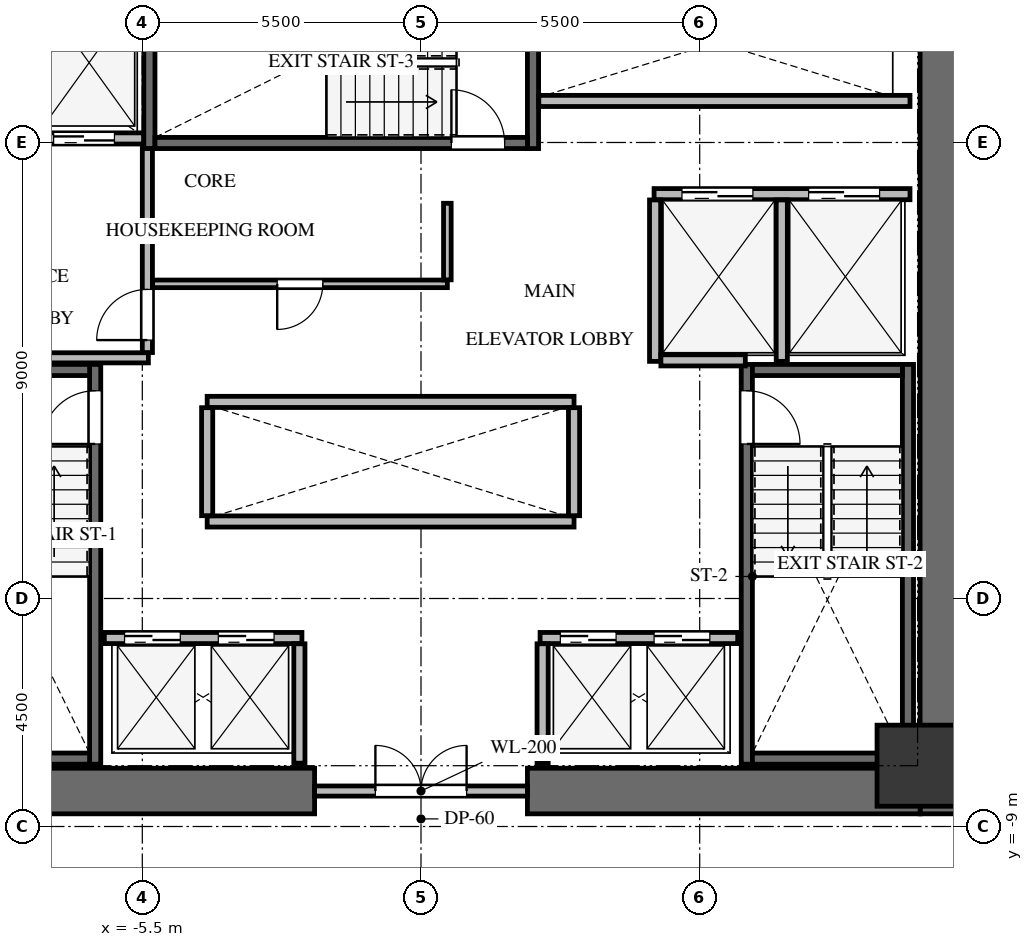
"""IFC4 building model, lengths in metres.
Left out: names, types, materials, properties, quantities, classifications, styles, units other than length and angle.
Written with IfcOpenShell. Run it as: python <this file> out.ifc"""

import sys

from ifc_helpers import new_model, si_unit, direction, frame, frame_2d, origin, origin_2d, place, context, subcontext, project, spatial, rectangle, extrude, source, transform, mapped, element, fill, save


model = new_model("IFC4")
c1 = context("Model", 3, precision=1e-05, world=origin(), true_north=direction((0.0, 1.0)))
c2 = subcontext(c1, "Body", "Model", "MODEL_VIEW")
j1 = project(units=[si_unit("LENGTHUNIT", "METRE"), si_unit("PLANEANGLEUNIT", "RADIAN")], contexts=[c1])
p1 = place(None, origin())
s1 = spatial("IfcSite", under=j1, at=p1, CompositionType="ELEMENT")
p2 = place(p1, origin())
s2 = spatial("IfcBuilding", under=s1, at=p2, CompositionType="ELEMENT")
p3 = place(p2, frame((0.0, 0.0, 58.8)))
s3 = spatial("IfcBuildingStorey", under=s2, at=p3, CompositionType="ELEMENT", Elevation=58.8)
p4 = place(p3, frame((10.3, -8.75, 0.0), z_axis=(0.0, 0.0, 1.0), x_axis=(0.0, 1.0, 0.0)))
e1 = element("IfcWall", 1, at=p4, inside=s3, PredefinedType="SHEAR", context=c2, shape_type="SweptSolid", body=[
    extrude(rectangle(XDim=17.5, YDim=0.9, at=frame_2d((8.75, 0.0))), origin(), (0.0, 0.0, 1.0), 3.3),
])
for number, where, z_axis, x_axis in (
    (2, (-9.85, -8.3, 0.0), (0.0, 0.0, 1.0), (1.0, 0.0, 0.0)),
    (3, (2.1, -8.3, 0.0), (0.0, 0.0, 1.0), (1.0, 0.0, 0.0)),
):
    element("IfcWall", number, at=place(p3, frame(where, z_axis=z_axis, x_axis=x_axis)), inside=s3, PredefinedType="SHEAR", context=c2, shape_type="SweptSolid", body=[
        extrude(rectangle(XDim=7.75, YDim=0.9, at=frame_2d((3.875, 0.0))), origin(), (0.0, 0.0, 1.0), 3.3),
    ])
p5 = place(p3, frame((-6.43, -7.77, -0.24), z_axis=(0.0, 0.0, 1.0), x_axis=(0.0, 1.0, 0.0)))
e4 = element("IfcWall", 4, at=p5, inside=s3, PredefinedType="SHEAR", context=c2, shape_type="SweptSolid", body=[
    extrude(rectangle(XDim=7.89, YDim=0.22, at=frame_2d((3.945, 0.0))), origin(), (0.0, 0.0, 1.0), 3.3),
])
p6 = place(p5, frame((6.32, 0.0, 0.0)))
e5 = element("IfcOpeningElement", 5, at=p6, cuts=e4, PredefinedType="OPENING", context=c2, shape_type="SweptSolid", body=[
    extrude(rectangle(XDim=1.05, YDim=2.15, at=frame_2d((0.525, 1.075))), frame((0.0, 0.12, 0.0), z_axis=(0.0, -1.0, 0.0), x_axis=(1.0, 0.0, 0.0)), (0.0, 0.0, 1.0), 0.24),
])
for number, where, z_axis, x_axis in (
    (6, (-9.5, -7.66, -0.24), (0.0, 0.0, 1.0), (1.0, 0.0, 0.0)),
    (7, (-6.54, 0.01, -0.24), (0.0, 0.0, 1.0), (-1.0, 0.0, 0.0)),
):
    element("IfcWall", number, at=place(p3, frame(where, z_axis=z_axis, x_axis=x_axis)), inside=s3, PredefinedType="SHEAR", context=c2, shape_type="SweptSolid", body=[
        extrude(rectangle(XDim=2.96, YDim=0.22, at=frame_2d((1.48, 0.0))), origin(), (0.0, 0.0, 1.0), 3.3),
    ])
p7 = place(p3, frame((9.61, -7.77, -0.24), z_axis=(0.0, 0.0, 1.0), x_axis=(0.0, 1.0, 0.0)))
e8 = element("IfcWall", 8, at=p7, inside=s3, PredefinedType="SHEAR", context=c2, shape_type="SweptSolid", body=[
    extrude(rectangle(XDim=7.89, YDim=0.22, at=frame_2d((3.945, 0.0))), origin(), (0.0, 0.0, 1.0), 3.3),
])
p8 = place(p3, frame((6.43, 0.12, -0.24), z_axis=(0.0, 0.0, 1.0), x_axis=(0.0, -1.0, 0.0)))
e9 = element("IfcWall", 9, at=p8, inside=s3, PredefinedType="SHEAR", context=c2, shape_type="SweptSolid", body=[
    extrude(rectangle(XDim=7.89, YDim=0.22, at=frame_2d((3.945, 0.0))), origin(), (0.0, 0.0, 1.0), 3.3),
])
p9 = place(p8, frame((0.52, 0.0, 0.0)))
e10 = element("IfcOpeningElement", 10, at=p9, cuts=e9, PredefinedType="OPENING", context=c2, shape_type="SweptSolid", body=[
    extrude(rectangle(XDim=1.05, YDim=2.15, at=frame_2d((0.525, 1.075))), frame((0.0, 0.12, 0.0), z_axis=(0.0, -1.0, 0.0), x_axis=(1.0, 0.0, 0.0)), (0.0, 0.0, 1.0), 0.24),
])
for number, where, z_axis, x_axis in (
    (11, (6.54, -7.66, -0.24), (0.0, 0.0, 1.0), (1.0, 0.0, 0.0)),
    (12, (9.5, 0.01, -0.24), (0.0, 0.0, 1.0), (-1.0, 0.0, 0.0)),
):
    element("IfcWall", number, at=place(p3, frame(where, z_axis=z_axis, x_axis=x_axis)), inside=s3, PredefinedType="SHEAR", context=c2, shape_type="SweptSolid", body=[
        extrude(rectangle(XDim=2.96, YDim=0.22, at=frame_2d((1.48, 0.0))), origin(), (0.0, 0.0, 1.0), 3.3),
    ])
for number, where, z_axis, x_axis in (
    (13, (2.21, 4.38, -0.24), (0.0, 0.0, 1.0), (0.0, 1.0, 0.0)),
    (14, (-5.36, 7.78, -0.24), (0.0, 0.0, 1.0), (0.0, -1.0, 0.0)),
):
    element("IfcWall", number, at=place(p3, frame(where, z_axis=z_axis, x_axis=x_axis)), inside=s3, PredefinedType="SHEAR", context=c2, shape_type="SweptSolid", body=[
        extrude(rectangle(XDim=3.4, YDim=0.22, at=frame_2d((1.7, 0.0))), origin(), (0.0, 0.0, 1.0), 3.3),
    ])
p10 = place(p3, frame((-5.25, 4.49, -0.24), z_axis=(0.0, 0.0, 1.0), x_axis=(1.0, 0.0, 0.0)))
e15 = element("IfcWall", 15, at=p10, inside=s3, PredefinedType="SHEAR", context=c2, shape_type="SweptSolid", body=[
    extrude(rectangle(XDim=7.35, YDim=0.22, at=frame_2d((3.675, 0.0))), origin(), (0.0, 0.0, 1.0), 3.3),
])
p11 = place(p10, frame((5.85, 0.0, 0.0)))
e16 = element("IfcOpeningElement", 16, at=p11, cuts=e15, PredefinedType="OPENING", context=c2, shape_type="SweptSolid", body=[
    extrude(rectangle(XDim=1.05, YDim=2.15, at=frame_2d((0.525, 1.075))), frame((0.0, 0.12, 0.0), z_axis=(0.0, -1.0, 0.0), x_axis=(1.0, 0.0, 0.0)), (0.0, 0.0, 1.0), 0.24),
])
m1 = source(origin(), c2, "Body", "SweptSolid", [
    extrude(rectangle(XDim=1.6, YDim=1.6, at=origin_2d()), origin(), (0.0, 0.0, 1.0), 3.3),
])
p12 = place(p3, frame((9.8, -7.8, -0.24), z_axis=(0.0, 0.0, 1.0), x_axis=(1.0, 0.0, 0.0)))
e17 = element("IfcColumn", 17, at=p12, inside=s3, PredefinedType="COLUMN", context=c2, shape_type="MappedRepresentation", body=[
    mapped(m1, transform((0.0, 0.0, 0.0), x_axis=(1.0, 0.0, 0.0), y_axis=(0.0, 1.0, 0.0), z_axis=(0.0, 0.0, 1.0), scale=1.0)),
])
p13 = place(p3, frame((-2.1, -8.3, 0.0), z_axis=(0.0, 0.0, 1.0), x_axis=(1.0, 0.0, 0.0)))
e18 = element("IfcWall", 18, at=p13, inside=s3, PredefinedType="SOLIDWALL", context=c2, shape_type="SweptSolid", body=[
    extrude(rectangle(XDim=4.2, YDim=0.2, at=frame_2d((2.1, 0.0))), origin(), (0.0, 0.0, 1.0), 3.045),
])
p14 = place(p13, frame((1.2, 0.0, 0.0)))
e19 = element("IfcOpeningElement", 19, at=p14, cuts=e18, PredefinedType="OPENING", context=c2, shape_type="SweptSolid", body=[
    extrude(rectangle(XDim=1.8, YDim=2.15, at=frame_2d((0.9, 1.075))), frame((0.0, 0.11, 0.0), z_axis=(0.0, -1.0, 0.0), x_axis=(1.0, 0.0, 0.0)), (0.0, 0.0, 1.0), 0.22),
])
p15 = place(p3, frame((-9.65, 4.58, 0.0), z_axis=(0.0, 0.0, 1.0), x_axis=(1.0, 0.0, 0.0)))
e20 = element("IfcWall", 20, at=p15, inside=s3, PredefinedType="SOLIDWALL", context=c2, shape_type="SweptSolid", body=[
    extrude(rectangle(XDim=4.175, YDim=0.22, at=frame_2d((2.087, 0.0))), origin(), (0.0, 0.0, 1.0), 3.045),
])
p16 = place(p15, frame((0.4, 0.0, 0.0)))
e21 = element("IfcOpeningElement", 21, at=p16, cuts=e20, PredefinedType="OPENING", context=c2, shape_type="SweptSolid", body=[
    extrude(rectangle(XDim=1.2, YDim=2.15, at=frame_2d((0.6, 1.075))), frame((0.0, 0.12, 0.0), z_axis=(0.0, -1.0, 0.0), x_axis=(1.0, 0.0, 0.0)), (0.0, 0.0, 1.0), 0.24),
])
p17 = place(p15, frame((2.4, 0.0, 0.0)))
e22 = element("IfcOpeningElement", 22, at=p17, cuts=e20, PredefinedType="OPENING", context=c2, shape_type="SweptSolid", body=[
    extrude(rectangle(XDim=1.2, YDim=2.15, at=frame_2d((0.6, 1.075))), frame((0.0, 0.12, 0.0), z_axis=(0.0, -1.0, 0.0), x_axis=(1.0, 0.0, 0.0)), (0.0, 0.0, 1.0), 0.24),
])
p18 = place(p3, frame((-9.65, 0.25, 0.0), z_axis=(0.0, 0.0, 1.0), x_axis=(1.0, 0.0, 0.0)))
e23 = element("IfcWall", 23, at=p18, inside=s3, PredefinedType="SOLIDWALL", context=c2, shape_type="SweptSolid", body=[
    extrude(rectangle(XDim=4.27, YDim=0.2, at=frame_2d((2.135, 0.0))), origin(), (0.0, 0.0, 1.0), 3.045),
])
p19 = place(p3, frame((-5.4, 0.354, 0.0), z_axis=(0.0, 0.0, 1.0), x_axis=(0.0, 1.0, 0.0)))
e24 = element("IfcWall", 24, at=p19, inside=s3, PredefinedType="SOLIDWALL", context=c2, shape_type="SweptSolid", body=[
    extrude(rectangle(XDim=4.026, YDim=0.2, at=frame_2d((2.013, 0.0))), origin(), (0.0, 0.0, 1.0), 3.045),
])
p20 = place(p19, frame((0.246, 0.0, 0.0)))
e25 = element("IfcOpeningElement", 25, at=p20, cuts=e24, PredefinedType="OPENING", context=c2, shape_type="SweptSolid", body=[
    extrude(rectangle(XDim=1.0, YDim=2.15, at=frame_2d((0.5, 1.075))), frame((0.0, 0.11, 0.0), z_axis=(0.0, -1.0, 0.0), x_axis=(1.0, 0.0, 0.0)), (0.0, 0.0, 1.0), 0.22),
])
p21 = place(p3, frame((4.6, 3.48, 0.0), z_axis=(0.0, 0.0, 1.0), x_axis=(1.0, 0.0, 0.0)))
e26 = element("IfcWall", 26, at=p21, inside=s3, PredefinedType="SOLIDWALL", context=c2, shape_type="SweptSolid", body=[
    extrude(rectangle(XDim=5.05, YDim=0.22, at=frame_2d((2.525, 0.0))), origin(), (0.0, 0.0, 1.0), 3.045),
])
p22 = place(p21, frame((0.55, 0.0, 0.0)))
e27 = element("IfcOpeningElement", 27, at=p22, cuts=e26, PredefinedType="OPENING", context=c2, shape_type="SweptSolid", body=[
    extrude(rectangle(XDim=1.4, YDim=2.15, at=frame_2d((0.7, 1.075))), frame((0.0, 0.12, 0.0), z_axis=(0.0, -1.0, 0.0), x_axis=(1.0, 0.0, 0.0)), (0.0, 0.0, 1.0), 0.24),
])
p23 = place(p21, frame((3.05, 0.0, 0.0)))
e28 = element("IfcOpeningElement", 28, at=p23, cuts=e26, PredefinedType="OPENING", context=c2, shape_type="SweptSolid", body=[
    extrude(rectangle(XDim=1.4, YDim=2.15, at=frame_2d((0.7, 1.075))), frame((0.0, 0.12, 0.0), z_axis=(0.0, -1.0, 0.0), x_axis=(1.0, 0.0, 0.0)), (0.0, 0.0, 1.0), 0.24),
])
for number, where, z_axis, x_axis in (
    (29, (4.62, 0.18, 0.0), (0.0, 0.0, 1.0), (0.0, 1.0, 0.0)),
    (30, (7.12, 0.18, 0.0), (0.0, 0.0, 1.0), (0.0, 1.0, 0.0)),
):
    element("IfcWall", number, at=place(p3, frame(where, z_axis=z_axis, x_axis=x_axis)), inside=s3, PredefinedType="SOLIDWALL", context=c2, shape_type="SweptSolid", body=[
        extrude(rectangle(XDim=3.186, YDim=0.22, at=frame_2d((1.593, 0.0))), origin(), (0.0, 0.0, 1.0), 3.045),
    ])
p24 = place(p3, frame((4.734, 0.2, 0.0), z_axis=(0.0, 0.0, 1.0), x_axis=(1.0, 0.0, 0.0)))
e31 = element("IfcWall", 31, at=p24, inside=s3, PredefinedType="SOLIDWALL", context=c2, shape_type="SweptSolid", body=[
    extrude(rectangle(XDim=1.666, YDim=0.22, at=frame_2d((0.833, 0.0))), origin(), (0.0, 0.0, 1.0), 3.045),
])
p25 = place(p3, frame((-6.25, -5.28, 0.0), z_axis=(0.0, 0.0, 1.0), x_axis=(1.0, 0.0, 0.0)))
e32 = element("IfcWall", 32, at=p25, inside=s3, PredefinedType="SOLIDWALL", context=c2, shape_type="SweptSolid", body=[
    extrude(rectangle(XDim=3.9, YDim=0.22, at=frame_2d((1.95, 0.0))), origin(), (0.0, 0.0, 1.0), 3.045),
])
p26 = place(p25, frame((0.4, 0.0, 0.0)))
e33 = element("IfcOpeningElement", 33, at=p26, cuts=e32, PredefinedType="OPENING", context=c2, shape_type="SweptSolid", body=[
    extrude(rectangle(XDim=1.1, YDim=2.15, at=frame_2d((0.55, 1.075))), frame((0.0, 0.12, 0.0), z_axis=(0.0, -1.0, 0.0), x_axis=(1.0, 0.0, 0.0)), (0.0, 0.0, 1.0), 0.24),
])
p27 = place(p25, frame((2.25, 0.0, 0.0)))
e34 = element("IfcOpeningElement", 34, at=p27, cuts=e32, PredefinedType="OPENING", context=c2, shape_type="SweptSolid", body=[
    extrude(rectangle(XDim=1.1, YDim=2.15, at=frame_2d((0.55, 1.075))), frame((0.0, 0.12, 0.0), z_axis=(0.0, -1.0, 0.0), x_axis=(1.0, 0.0, 0.0)), (0.0, 0.0, 1.0), 0.24),
])
p28 = place(p3, frame((2.35, -5.28, 0.0), z_axis=(0.0, 0.0, 1.0), x_axis=(1.0, 0.0, 0.0)))
e35 = element("IfcWall", 35, at=p28, inside=s3, PredefinedType="SOLIDWALL", context=c2, shape_type="SweptSolid", body=[
    extrude(rectangle(XDim=3.9, YDim=0.22, at=frame_2d((1.95, 0.0))), origin(), (0.0, 0.0, 1.0), 3.045),
])
p29 = place(p28, frame((0.4, 0.0, 0.0)))
e36 = element("IfcOpeningElement", 36, at=p29, cuts=e35, PredefinedType="OPENING", context=c2, shape_type="SweptSolid", body=[
    extrude(rectangle(XDim=1.1, YDim=2.15, at=frame_2d((0.55, 1.075))), frame((0.0, 0.12, 0.0), z_axis=(0.0, -1.0, 0.0), x_axis=(1.0, 0.0, 0.0)), (0.0, 0.0, 1.0), 0.24),
])
p30 = place(p28, frame((2.25, 0.0, 0.0)))
e37 = element("IfcOpeningElement", 37, at=p30, cuts=e35, PredefinedType="OPENING", context=c2, shape_type="SweptSolid", body=[
    extrude(rectangle(XDim=1.1, YDim=2.15, at=frame_2d((0.55, 1.075))), frame((0.0, 0.12, 0.0), z_axis=(0.0, -1.0, 0.0), x_axis=(1.0, 0.0, 0.0)), (0.0, 0.0, 1.0), 0.24),
])
for number, where, z_axis, x_axis in (
    (38, (-2.4, -7.75, 0.0), (0.0, 0.0, 1.0), (0.0, 1.0, 0.0)),
    (39, (2.4, -7.75, 0.0), (0.0, 0.0, 1.0), (0.0, 1.0, 0.0)),
):
    element("IfcWall", number, at=place(p3, frame(where, z_axis=z_axis, x_axis=x_axis)), inside=s3, PredefinedType="SOLIDWALL", context=c2, shape_type="SweptSolid", body=[
        extrude(rectangle(XDim=2.356, YDim=0.22, at=frame_2d((1.178, 0.0))), origin(), (0.0, 0.0, 1.0), 3.045),
    ])
for number, where, z_axis, x_axis in (
    (40, (-4.22, -2.98, 0.0), (0.0, 0.0, 1.0), (1.0, 0.0, 0.0)),
    (41, (-4.22, -0.62, 0.0), (0.0, 0.0, 1.0), (1.0, 0.0, 0.0)),
):
    element("IfcWall", number, at=place(p3, frame(where, z_axis=z_axis, x_axis=x_axis)), inside=s3, PredefinedType="SOLIDWALL", context=c2, shape_type="SweptSolid", body=[
        extrude(rectangle(XDim=7.24, YDim=0.22, at=frame_2d((3.62, 0.0))), origin(), (0.0, 0.0, 1.0), 3.045),
    ])
for number, where, z_axis, x_axis in (
    (42, (-4.22, -2.866, 0.0), (0.0, 0.0, 1.0), (0.0, 1.0, 0.0)),
    (43, (3.02, -2.866, 0.0), (0.0, 0.0, 1.0), (0.0, 1.0, 0.0)),
):
    element("IfcWall", number, at=place(p3, frame(where, z_axis=z_axis, x_axis=x_axis)), inside=s3, PredefinedType="SOLIDWALL", context=c2, shape_type="SweptSolid", body=[
        extrude(rectangle(XDim=2.132, YDim=0.22, at=frame_2d((1.066, 0.0))), origin(), (0.0, 0.0, 1.0), 3.045),
    ])
p31 = place(p3, frame((2.325, 5.32, 0.0), z_axis=(0.0, 0.0, 1.0), x_axis=(1.0, 0.0, 0.0)))
e44 = element("IfcWall", 44, at=p31, inside=s3, PredefinedType="SOLIDWALL", context=c2, shape_type="SweptSolid", body=[
    extrude(rectangle(XDim=7.325, YDim=0.22, at=frame_2d((3.663, 0.0))), origin(), (0.0, 0.0, 1.0), 3.045),
])
p32 = place(p3, frame((0.52, 1.71, 0.0), z_axis=(0.0, 0.0, 1.0), x_axis=(-1.0, 0.0, 0.0)))
e45 = element("IfcWall", 45, at=p32, inside=s3, PredefinedType="PARTITIONING", context=c2, shape_type="SweptSolid", body=[
    extrude(rectangle(XDim=5.816, YDim=0.15, at=frame_2d((2.908, 0.0))), origin(), (0.0, 0.0, 1.0), 3.045),
])
p33 = place(p32, frame((2.458, 0.0, 0.0)))
e46 = element("IfcOpeningElement", 46, at=p33, cuts=e45, PredefinedType="OPENING", context=c2, shape_type="SweptSolid", body=[
    extrude(rectangle(XDim=0.9, YDim=2.05, at=frame_2d((0.45, 1.025))), frame((0.0, 0.085, 0.0), z_axis=(0.0, -1.0, 0.0), x_axis=(1.0, 0.0, 0.0)), (0.0, 0.0, 1.0), 0.17),
])
p34 = place(p3, frame((0.52, 3.3, 0.0), z_axis=(0.0, 0.0, 1.0), x_axis=(0.0, -1.0, 0.0)))
e47 = element("IfcWall", 47, at=p34, inside=s3, PredefinedType="PARTITIONING", context=c2, shape_type="SweptSolid", body=[
    extrude(rectangle(XDim=1.511, YDim=0.15, at=frame_2d((0.755, 0.0))), origin(), (0.0, 0.0, 1.0), 3.045),
])
m2 = source(origin(), c2, "Body", "SweptSolid", [
    extrude(rectangle(XDim=1.05, YDim=2.15, at=frame_2d((0.525, 1.075))), frame((0.0, 0.025, 0.0), z_axis=(0.0, -1.0, 0.0), x_axis=(1.0, 0.0, 0.0)), (0.0, 0.0, 1.0), 0.05),
])
p35 = place(p6, origin())
e48 = element("IfcDoor", 48, at=p35, inside=s3, OperationType="SINGLE_SWING_LEFT", PredefinedType="DOOR", context=c2, shape_type="MappedRepresentation", body=[
    mapped(m2, transform((0.0, 0.0, 0.0), x_axis=(1.0, 0.0, 0.0), y_axis=(0.0, 1.0, 0.0), z_axis=(0.0, 0.0, 1.0), scale=1.0)),
])
fill(e5, e48)
m3 = source(origin(), c2, "Body", "SweptSolid", [
    extrude(rectangle(XDim=1.05, YDim=2.15, at=frame_2d((0.525, 1.075))), frame((0.0, 0.025, 0.0), z_axis=(0.0, -1.0, 0.0), x_axis=(1.0, 0.0, 0.0)), (0.0, 0.0, 1.0), 0.05),
])
p36 = place(p9, origin())
e49 = element("IfcDoor", 49, at=p36, inside=s3, OperationType="SINGLE_SWING_RIGHT", PredefinedType="DOOR", context=c2, shape_type="MappedRepresentation", body=[
    mapped(m3, transform((0.0, 0.0, 0.0), x_axis=(1.0, 0.0, 0.0), y_axis=(0.0, 1.0, 0.0), z_axis=(0.0, 0.0, 1.0), scale=1.0)),
])
fill(e10, e49)
p37 = place(p11, origin())
e50 = element("IfcDoor", 50, at=p37, inside=s3, OperationType="SINGLE_SWING_LEFT", PredefinedType="DOOR", context=c2, shape_type="MappedRepresentation", body=[
    mapped(m2, transform((0.0, 0.0, 0.0), x_axis=(1.0, 0.0, 0.0), y_axis=(0.0, 1.0, 0.0), z_axis=(0.0, 0.0, 1.0), scale=1.0)),
])
fill(e16, e50)
m4 = source(origin(), c2, "Body", "SweptSolid", [
    extrude(rectangle(XDim=1.8, YDim=2.15, at=frame_2d((0.9, 1.075))), frame((0.0, 0.025, 0.0), z_axis=(0.0, -1.0, 0.0), x_axis=(1.0, 0.0, 0.0)), (0.0, 0.0, 1.0), 0.05),
])
p38 = place(p14, origin())
e51 = element("IfcDoor", 51, at=p38, inside=s3, OperationType="DOUBLE_DOOR_SINGLE_SWING", PredefinedType="DOOR", context=c2, shape_type="MappedRepresentation", body=[
    mapped(m4, transform((0.0, 0.0, 0.0), x_axis=(1.0, 0.0, 0.0), y_axis=(0.0, 1.0, 0.0), z_axis=(0.0, 0.0, 1.0), scale=1.0)),
])
fill(e19, e51)
m5 = source(origin(), c2, "Body", "SweptSolid", [
    extrude(rectangle(XDim=1.2, YDim=2.15, at=frame_2d((0.6, 1.075))), frame((0.0, 0.025, 0.0), z_axis=(0.0, -1.0, 0.0), x_axis=(1.0, 0.0, 0.0)), (0.0, 0.0, 1.0), 0.05),
])
p39 = place(p17, origin())
e52 = element("IfcDoor", 52, at=p39, inside=s3, OperationType="DOUBLE_DOOR_SLIDING", PredefinedType="DOOR", context=c2, shape_type="MappedRepresentation", body=[
    mapped(m5, transform((0.0, 0.0, 0.0), x_axis=(1.0, 0.0, 0.0), y_axis=(0.0, 1.0, 0.0), z_axis=(0.0, 0.0, 1.0), scale=1.0)),
])
fill(e22, e52)
m6 = source(origin(), c2, "Body", "SweptSolid", [
    extrude(rectangle(XDim=1.0, YDim=2.15, at=frame_2d((0.5, 1.075))), frame((0.0, 0.025, 0.0), z_axis=(0.0, -1.0, 0.0), x_axis=(1.0, 0.0, 0.0)), (0.0, 0.0, 1.0), 0.05),
])
p40 = place(p20, origin())
e53 = element("IfcDoor", 53, at=p40, inside=s3, OperationType="SINGLE_SWING_LEFT", PredefinedType="DOOR", context=c2, shape_type="MappedRepresentation", body=[
    mapped(m6, transform((0.0, 0.0, 0.0), x_axis=(1.0, 0.0, 0.0), y_axis=(0.0, 1.0, 0.0), z_axis=(0.0, 0.0, 1.0), scale=1.0)),
])
fill(e25, e53)
m7 = source(origin(), c2, "Body", "SweptSolid", [
    extrude(rectangle(XDim=1.4, YDim=2.15, at=frame_2d((0.7, 1.075))), frame((0.0, 0.025, 0.0), z_axis=(0.0, -1.0, 0.0), x_axis=(1.0, 0.0, 0.0)), (0.0, 0.0, 1.0), 0.05),
])
p41 = place(p22, origin())
e54 = element("IfcDoor", 54, at=p41, inside=s3, OperationType="DOUBLE_DOOR_SLIDING", PredefinedType="DOOR", context=c2, shape_type="MappedRepresentation", body=[
    mapped(m7, transform((0.0, 0.0, 0.0), x_axis=(1.0, 0.0, 0.0), y_axis=(0.0, 1.0, 0.0), z_axis=(0.0, 0.0, 1.0), scale=1.0)),
])
fill(e27, e54)
p42 = place(p23, origin())
e55 = element("IfcDoor", 55, at=p42, inside=s3, OperationType="DOUBLE_DOOR_SLIDING", PredefinedType="DOOR", context=c2, shape_type="MappedRepresentation", body=[
    mapped(m7, transform((0.0, 0.0, 0.0), x_axis=(1.0, 0.0, 0.0), y_axis=(0.0, 1.0, 0.0), z_axis=(0.0, 0.0, 1.0), scale=1.0)),
])
fill(e28, e55)
m8 = source(origin(), c2, "Body", "SweptSolid", [
    extrude(rectangle(XDim=1.1, YDim=2.15, at=frame_2d((0.55, 1.075))), frame((0.0, 0.025, 0.0), z_axis=(0.0, -1.0, 0.0), x_axis=(1.0, 0.0, 0.0)), (0.0, 0.0, 1.0), 0.05),
])
p43 = place(p26, origin())
e56 = element("IfcDoor", 56, at=p43, inside=s3, OperationType="DOUBLE_DOOR_SLIDING", PredefinedType="DOOR", context=c2, shape_type="MappedRepresentation", body=[
    mapped(m8, transform((0.0, 0.0, 0.0), x_axis=(1.0, 0.0, 0.0), y_axis=(0.0, 1.0, 0.0), z_axis=(0.0, 0.0, 1.0), scale=1.0)),
])
fill(e33, e56)
p44 = place(p27, origin())
e57 = element("IfcDoor", 57, at=p44, inside=s3, OperationType="DOUBLE_DOOR_SLIDING", PredefinedType="DOOR", context=c2, shape_type="MappedRepresentation", body=[
    mapped(m8, transform((0.0, 0.0, 0.0), x_axis=(1.0, 0.0, 0.0), y_axis=(0.0, 1.0, 0.0), z_axis=(0.0, 0.0, 1.0), scale=1.0)),
])
fill(e34, e57)
p45 = place(p29, origin())
e58 = element("IfcDoor", 58, at=p45, inside=s3, OperationType="DOUBLE_DOOR_SLIDING", PredefinedType="DOOR", context=c2, shape_type="MappedRepresentation", body=[
    mapped(m8, transform((0.0, 0.0, 0.0), x_axis=(1.0, 0.0, 0.0), y_axis=(0.0, 1.0, 0.0), z_axis=(0.0, 0.0, 1.0), scale=1.0)),
])
fill(e36, e58)
p46 = place(p30, origin())
e59 = element("IfcDoor", 59, at=p46, inside=s3, OperationType="DOUBLE_DOOR_SLIDING", PredefinedType="DOOR", context=c2, shape_type="MappedRepresentation", body=[
    mapped(m8, transform((0.0, 0.0, 0.0), x_axis=(1.0, 0.0, 0.0), y_axis=(0.0, 1.0, 0.0), z_axis=(0.0, 0.0, 1.0), scale=1.0)),
])
fill(e37, e59)
m9 = source(origin(), c2, "Body", "SweptSolid", [
    extrude(rectangle(XDim=0.9, YDim=2.05, at=frame_2d((0.45, 1.025))), frame((0.0, 0.025, 0.0), z_axis=(0.0, -1.0, 0.0), x_axis=(1.0, 0.0, 0.0)), (0.0, 0.0, 1.0), 0.05),
])
p47 = place(p33, origin())
e60 = element("IfcDoor", 60, at=p47, inside=s3, OperationType="SINGLE_SWING_RIGHT", PredefinedType="DOOR", context=c2, shape_type="MappedRepresentation", body=[
    mapped(m9, transform((0.0, 0.0, 0.0), x_axis=(1.0, 0.0, 0.0), y_axis=(0.0, 1.0, 0.0), z_axis=(0.0, 0.0, 1.0), scale=1.0)),
])
fill(e46, e60)
save(model, sys.argv[1])
